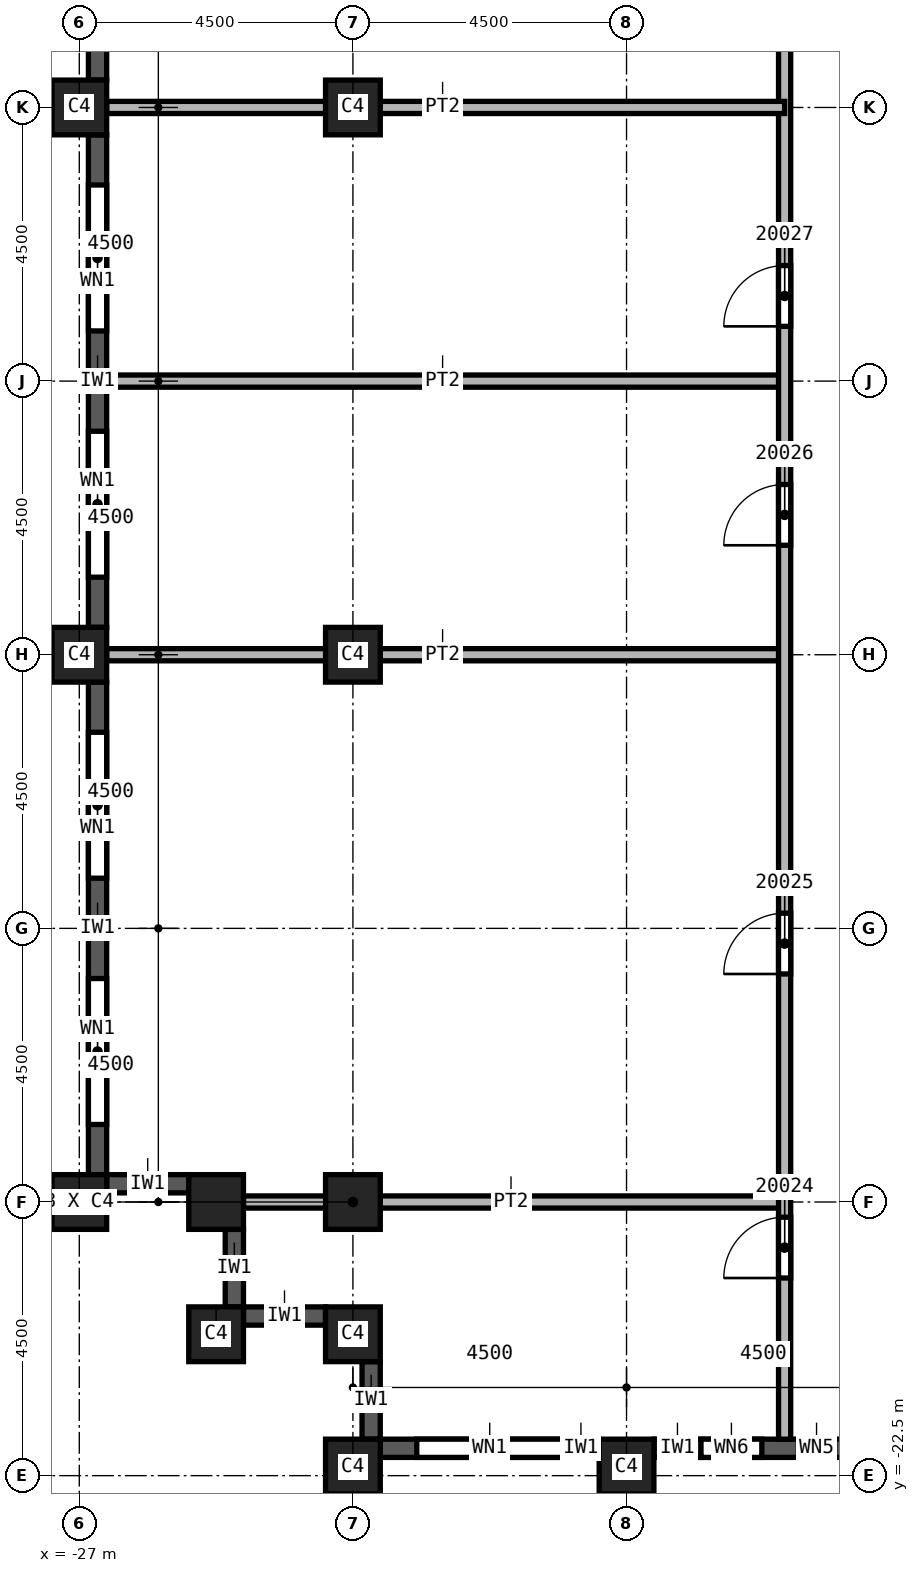
"""IFC4 building model, lengths in metres.
Left out: names, types, materials, properties, quantities, classifications, styles, units other than length and angle.
Written with IfcOpenShell. Run it as: python <this file> out.ifc"""

import sys

from ifc_helpers import new_model, si_unit, direction, frame, frame_2d, origin, origin_2d, place, context, subcontext, project, spatial, rectangle, extrude, element, fill, save


model = new_model("IFC4")
c1 = context("Model", 3, precision=1e-05, world=origin(), true_north=direction((0.0, 1.0)))
c2 = subcontext(c1, "Body", "Model", "MODEL_VIEW")
j1 = project(units=[si_unit("LENGTHUNIT", "METRE"), si_unit("PLANEANGLEUNIT", "RADIAN")], contexts=[c1])
p1 = place(None, origin())
s1 = spatial("IfcSite", under=j1, at=p1, CompositionType="ELEMENT")
p2 = place(p1, origin())
s2 = spatial("IfcBuilding", under=s1, at=p2, CompositionType="ELEMENT")
p3 = place(p2, frame((0.0, 0.0, 290.0)))
s3 = spatial("IfcBuildingStorey", under=s2, at=p3, CompositionType="ELEMENT", Elevation=290.0)
for number, where, z_axis, x_axis in (
    (1, (-22.5, 0.0, 0.0), (0.0, 0.0, 1.0), (1.0, 0.0, 0.0)),
    (2, (-22.5, -9.0, 0.0), (0.0, 0.0, 1.0), (1.0, 0.0, 0.0)),
    (3, (-22.5, -18.0, 0.0), (0.0, 0.0, 1.0), (1.0, 0.0, 0.0)),
    (4, (-18.0, -22.35, 0.0), (0.0, 0.0, 1.0), (1.0, 0.0, 0.0)),
    (5, (-22.5, -22.35, 0.0), (0.0, 0.0, 1.0), (1.0, 0.0, 0.0)),
    (6, (-27.0, 0.0, 0.0), (0.0, 0.0, 1.0), (0.0, 1.0, 0.0)),
    (7, (-27.0, -9.0, 0.0), (0.0, 0.0, 1.0), (0.0, 1.0, 0.0)),
    (8, (-27.0, -18.0, 0.0), (0.0, 0.0, 1.0), (0.0, 1.0, 0.0)),
    (9, (-22.5, -20.175, 0.0), (0.0, 0.0, 1.0), (1.0, 0.0, 0.0)),
    (10, (-24.75, -20.175, 0.0), (0.0, 0.0, 1.0), (1.0, 0.0, 0.0)),
    (11, (-24.75, -18.0, 0.0), (0.0, 0.0, 1.0), (1.0, 0.0, 0.0)),
):
    element("IfcColumn", number, at=place(p3, frame(where, z_axis=z_axis, x_axis=x_axis)), inside=s3, PredefinedType="COLUMN", context=c2, shape_type="SweptSolid", body=[
        extrude(rectangle(XDim=0.9, YDim=0.9, at=origin_2d()), origin(), (0.0, 0.0, 1.0), 3.59),
    ])
p4 = place(p3, frame((-26.7, 8.55, 0.0), z_axis=(0.0, 0.0, 1.0), x_axis=(0.0, -1.0, 0.0)))
e12 = element("IfcWall", 12, at=p4, inside=s3, PredefinedType="SOLIDWALL", context=c2, shape_type="SweptSolid", body=[
    extrude(rectangle(XDim=8.1, YDim=0.3, at=frame_2d((4.05, 0.0))), origin(), (0.0, 0.0, 1.0), 2.99),
])
p5 = place(p4, frame((0.825, 0.0, 0.8)))
e13 = element("IfcOpeningElement", 13, at=p5, cuts=e12, PredefinedType="OPENING", context=c2, shape_type="SweptSolid", body=[
    extrude(rectangle(XDim=2.4, YDim=1.95, at=frame_2d((1.2, 0.975))), frame((0.0, 0.15, 0.0), z_axis=(0.0, -1.0, 0.0), x_axis=(1.0, 0.0, 0.0)), (0.0, 0.0, 1.0), 0.3),
])
p6 = place(p4, frame((4.875, 0.0, 0.8)))
e14 = element("IfcOpeningElement", 14, at=p6, cuts=e12, PredefinedType="OPENING", context=c2, shape_type="SweptSolid", body=[
    extrude(rectangle(XDim=2.4, YDim=1.95, at=frame_2d((1.2, 0.975))), frame((0.0, 0.15, 0.0), z_axis=(0.0, -1.0, 0.0), x_axis=(1.0, 0.0, 0.0)), (0.0, 0.0, 1.0), 0.3),
])
p7 = place(p3, frame((-26.7, -0.45, 0.0), z_axis=(0.0, 0.0, 1.0), x_axis=(0.0, -1.0, 0.0)))
e15 = element("IfcWall", 15, at=p7, inside=s3, PredefinedType="SOLIDWALL", context=c2, shape_type="SweptSolid", body=[
    extrude(rectangle(XDim=8.1, YDim=0.3, at=frame_2d((4.05, 0.0))), origin(), (0.0, 0.0, 1.0), 2.99),
])
p8 = place(p7, frame((0.825, 0.0, 0.8)))
e16 = element("IfcOpeningElement", 16, at=p8, cuts=e15, PredefinedType="OPENING", context=c2, shape_type="SweptSolid", body=[
    extrude(rectangle(XDim=2.4, YDim=1.95, at=frame_2d((1.2, 0.975))), frame((0.0, 0.15, 0.0), z_axis=(0.0, -1.0, 0.0), x_axis=(1.0, 0.0, 0.0)), (0.0, 0.0, 1.0), 0.3),
])
p9 = place(p7, frame((4.875, 0.0, 0.8)))
e17 = element("IfcOpeningElement", 17, at=p9, cuts=e15, PredefinedType="OPENING", context=c2, shape_type="SweptSolid", body=[
    extrude(rectangle(XDim=2.4, YDim=1.95, at=frame_2d((1.2, 0.975))), frame((0.0, 0.15, 0.0), z_axis=(0.0, -1.0, 0.0), x_axis=(1.0, 0.0, 0.0)), (0.0, 0.0, 1.0), 0.3),
])
p10 = place(p3, frame((-26.7, -9.45, 0.0), z_axis=(0.0, 0.0, 1.0), x_axis=(0.0, -1.0, 0.0)))
e18 = element("IfcWall", 18, at=p10, inside=s3, PredefinedType="SOLIDWALL", context=c2, shape_type="SweptSolid", body=[
    extrude(rectangle(XDim=8.1, YDim=0.3, at=frame_2d((4.05, 0.0))), origin(), (0.0, 0.0, 1.0), 2.99),
])
p11 = place(p10, frame((0.825, 0.0, 0.8)))
e19 = element("IfcOpeningElement", 19, at=p11, cuts=e18, PredefinedType="OPENING", context=c2, shape_type="SweptSolid", body=[
    extrude(rectangle(XDim=2.4, YDim=1.95, at=frame_2d((1.2, 0.975))), frame((0.0, 0.15, 0.0), z_axis=(0.0, -1.0, 0.0), x_axis=(1.0, 0.0, 0.0)), (0.0, 0.0, 1.0), 0.3),
])
p12 = place(p10, frame((4.875, 0.0, 0.8)))
e20 = element("IfcOpeningElement", 20, at=p12, cuts=e18, PredefinedType="OPENING", context=c2, shape_type="SweptSolid", body=[
    extrude(rectangle(XDim=2.4, YDim=1.95, at=frame_2d((1.2, 0.975))), frame((0.0, 0.15, 0.0), z_axis=(0.0, -1.0, 0.0), x_axis=(1.0, 0.0, 0.0)), (0.0, 0.0, 1.0), 0.3),
])
p13 = place(p3, frame((-26.55, -17.7, 0.0), z_axis=(0.0, 0.0, 1.0), x_axis=(1.0, 0.0, 0.0)))
e21 = element("IfcWall", 21, at=p13, inside=s3, PredefinedType="SOLIDWALL", context=c2, shape_type="SweptSolid", body=[
    extrude(rectangle(XDim=1.35, YDim=0.3, at=frame_2d((0.675, 0.0))), origin(), (0.0, 0.0, 1.0), 2.99),
])
p14 = place(p3, frame((-24.45, -18.45, 0.0), z_axis=(0.0, 0.0, 1.0), x_axis=(0.0, -1.0, 0.0)))
e22 = element("IfcWall", 22, at=p14, inside=s3, PredefinedType="SOLIDWALL", context=c2, shape_type="SweptSolid", body=[
    extrude(rectangle(XDim=1.275, YDim=0.3, at=frame_2d((0.638, 0.0))), origin(), (0.0, 0.0, 1.0), 2.99),
])
p15 = place(p3, frame((-24.3, -19.875, 0.0), z_axis=(0.0, 0.0, 1.0), x_axis=(1.0, 0.0, 0.0)))
e23 = element("IfcWall", 23, at=p15, inside=s3, PredefinedType="SOLIDWALL", context=c2, shape_type="SweptSolid", body=[
    extrude(rectangle(XDim=1.35, YDim=0.3, at=frame_2d((0.675, 0.0))), origin(), (0.0, 0.0, 1.0), 2.99),
])
p16 = place(p3, frame((-22.2, -20.625, 0.0), z_axis=(0.0, 0.0, 1.0), x_axis=(0.0, -1.0, 0.0)))
e24 = element("IfcWall", 24, at=p16, inside=s3, PredefinedType="SOLIDWALL", context=c2, shape_type="SweptSolid", body=[
    extrude(rectangle(XDim=1.275, YDim=0.3, at=frame_2d((0.637, 0.0))), origin(), (0.0, 0.0, 1.0), 2.99),
])
p17 = place(p3, frame((-22.05, -22.05, 0.0), z_axis=(0.0, 0.0, 1.0), x_axis=(1.0, 0.0, 0.0)))
e25 = element("IfcWall", 25, at=p17, inside=s3, PredefinedType="SOLIDWALL", context=c2, shape_type="SweptSolid", body=[
    extrude(rectangle(XDim=3.6, YDim=0.3, at=frame_2d((1.8, 0.0))), origin(), (0.0, 0.0, 1.0), 2.99),
])
p18 = place(p17, frame((0.6, 0.0, 0.8)))
e26 = element("IfcOpeningElement", 26, at=p18, cuts=e25, PredefinedType="OPENING", context=c2, shape_type="SweptSolid", body=[
    extrude(rectangle(XDim=2.4, YDim=1.95, at=frame_2d((1.2, 0.975))), frame((0.0, 0.15, 0.0), z_axis=(0.0, -1.0, 0.0), x_axis=(1.0, 0.0, 0.0)), (0.0, 0.0, 1.0), 0.3),
])
p19 = place(p3, frame((-17.55, -22.05, 0.0), z_axis=(0.0, 0.0, 1.0), x_axis=(1.0, 0.0, 0.0)))
e27 = element("IfcWall", 27, at=p19, inside=s3, PredefinedType="SOLIDWALL", context=c2, shape_type="SweptSolid", body=[
    extrude(rectangle(XDim=3.6, YDim=0.3, at=frame_2d((1.8, 0.0))), origin(), (0.0, 0.0, 1.0), 2.99),
])
p20 = place(p19, frame((0.775, 0.0, 0.8)))
e28 = element("IfcOpeningElement", 28, at=p20, cuts=e27, PredefinedType="OPENING", context=c2, shape_type="SweptSolid", body=[
    extrude(rectangle(XDim=1.0, YDim=1.95, at=frame_2d((0.5, 0.975))), frame((0.0, 0.15, 0.0), z_axis=(0.0, -1.0, 0.0), x_axis=(1.0, 0.0, 0.0)), (0.0, 0.0, 1.0), 0.3),
])
p21 = place(p19, frame((2.375, 0.0, 0.8)))
e29 = element("IfcOpeningElement", 29, at=p21, cuts=e27, PredefinedType="OPENING", context=c2, shape_type="SweptSolid", body=[
    extrude(rectangle(XDim=0.6, YDim=1.95, at=frame_2d((0.3, 0.975))), frame((0.0, 0.15, 0.0), z_axis=(0.0, -1.0, 0.0), x_axis=(1.0, 0.0, 0.0)), (0.0, 0.0, 1.0), 0.3),
])
for number, where, z_axis, x_axis in (
    (30, (-26.55, -9.0, 0.0), (0.0, 0.0, 1.0), (1.0, 0.0, 0.0)),
    (31, (-26.55, -4.5, 0.0), (0.0, 0.0, 1.0), (1.0, 0.0, 0.0)),
):
    element("IfcWall", number, at=place(p3, frame(where, z_axis=z_axis, x_axis=x_axis)), inside=s3, PredefinedType="PARTITIONING", context=c2, shape_type="SweptSolid", body=[
        extrude(rectangle(XDim=11.15, YDim=0.2, at=frame_2d((5.575, 0.0))), origin(), (0.0, 0.0, 1.0), 3.59),
    ])
p22 = place(p3, frame((-24.3, -18.0, 0.0), z_axis=(0.0, 0.0, 1.0), x_axis=(1.0, 0.0, 0.0)))
e32 = element("IfcWall", 32, at=p22, inside=s3, PredefinedType="PARTITIONING", context=c2, shape_type="SweptSolid", body=[
    extrude(rectangle(XDim=8.9, YDim=0.2, at=frame_2d((4.45, 0.0))), origin(), (0.0, 0.0, 1.0), 3.59),
])
p23 = place(p3, frame((-15.4, -21.9, 0.0), z_axis=(0.0, 0.0, 1.0), x_axis=(0.0, 1.0, 0.0)))
e33 = element("IfcWall", 33, at=p23, inside=s3, PredefinedType="PARTITIONING", context=c2, shape_type="SweptSolid", body=[
    extrude(rectangle(XDim=35.5, YDim=0.2, at=frame_2d((17.75, 0.0))), origin(), (0.0, 0.0, 1.0), 3.59),
])
p24 = place(p23, frame((30.9, 0.0, 0.0)))
e34 = element("IfcOpeningElement", 34, at=p24, cuts=e33, PredefinedType="OPENING", context=c2, shape_type="SweptSolid", body=[
    extrude(rectangle(XDim=1.0, YDim=2.1, at=frame_2d((0.5, 1.05))), frame((0.0, 0.1, 0.0), z_axis=(0.0, -1.0, 0.0), x_axis=(1.0, 0.0, 0.0)), (0.0, 0.0, 1.0), 0.2),
])
p25 = place(p23, frame((2.65, 0.0, 0.0)))
e35 = element("IfcOpeningElement", 35, at=p25, cuts=e33, PredefinedType="OPENING", context=c2, shape_type="SweptSolid", body=[
    extrude(rectangle(XDim=1.0, YDim=2.1, at=frame_2d((0.5, 1.05))), frame((0.0, 0.1, 0.0), z_axis=(0.0, -1.0, 0.0), x_axis=(1.0, 0.0, 0.0)), (0.0, 0.0, 1.0), 0.2),
])
p26 = place(p23, frame((7.65, 0.0, 0.0)))
e36 = element("IfcOpeningElement", 36, at=p26, cuts=e33, PredefinedType="OPENING", context=c2, shape_type="SweptSolid", body=[
    extrude(rectangle(XDim=1.0, YDim=2.1, at=frame_2d((0.5, 1.05))), frame((0.0, 0.1, 0.0), z_axis=(0.0, -1.0, 0.0), x_axis=(1.0, 0.0, 0.0)), (0.0, 0.0, 1.0), 0.2),
])
p27 = place(p23, frame((14.7, 0.0, 0.0)))
e37 = element("IfcOpeningElement", 37, at=p27, cuts=e33, PredefinedType="OPENING", context=c2, shape_type="SweptSolid", body=[
    extrude(rectangle(XDim=1.0, YDim=2.1, at=frame_2d((0.5, 1.05))), frame((0.0, 0.1, 0.0), z_axis=(0.0, -1.0, 0.0), x_axis=(1.0, 0.0, 0.0)), (0.0, 0.0, 1.0), 0.2),
])
p28 = place(p23, frame((18.3, 0.0, 0.0)))
e38 = element("IfcOpeningElement", 38, at=p28, cuts=e33, PredefinedType="OPENING", context=c2, shape_type="SweptSolid", body=[
    extrude(rectangle(XDim=1.0, YDim=2.1, at=frame_2d((0.5, 1.05))), frame((0.0, 0.1, 0.0), z_axis=(0.0, -1.0, 0.0), x_axis=(1.0, 0.0, 0.0)), (0.0, 0.0, 1.0), 0.2),
])
p29 = place(p3, frame((-15.4, 0.0, 0.0), z_axis=(0.0, 0.0, 1.0), x_axis=(-1.0, 0.0, 0.0)))
e39 = element("IfcWall", 39, at=p29, inside=s3, PredefinedType="PARTITIONING", context=c2, shape_type="SweptSolid", body=[
    extrude(rectangle(XDim=11.15, YDim=0.2, at=frame_2d((5.575, 0.0))), origin(), (0.0, 0.0, 1.0), 3.59),
])
p30 = place(p8, origin())
e40 = element("IfcWindow", 40, at=p30, inside=s3, PartitioningType="SINGLE_PANEL", PredefinedType="WINDOW", context=c2, shape_type="SweptSolid", body=[
    extrude(rectangle(XDim=2.4, YDim=1.95, at=frame_2d((1.2, 0.975))), frame((0.0, 0.03, 0.0), z_axis=(0.0, -1.0, 0.0), x_axis=(1.0, 0.0, 0.0)), (0.0, 0.0, 1.0), 0.06),
])
fill(e16, e40)
p31 = place(p9, origin())
e41 = element("IfcWindow", 41, at=p31, inside=s3, PartitioningType="SINGLE_PANEL", PredefinedType="WINDOW", context=c2, shape_type="SweptSolid", body=[
    extrude(rectangle(XDim=2.4, YDim=1.95, at=frame_2d((1.2, 0.975))), frame((0.0, 0.03, 0.0), z_axis=(0.0, -1.0, 0.0), x_axis=(1.0, 0.0, 0.0)), (0.0, 0.0, 1.0), 0.06),
])
fill(e17, e41)
p32 = place(p11, origin())
e42 = element("IfcWindow", 42, at=p32, inside=s3, PartitioningType="SINGLE_PANEL", PredefinedType="WINDOW", context=c2, shape_type="SweptSolid", body=[
    extrude(rectangle(XDim=2.4, YDim=1.95, at=frame_2d((1.2, 0.975))), frame((0.0, 0.03, 0.0), z_axis=(0.0, -1.0, 0.0), x_axis=(1.0, 0.0, 0.0)), (0.0, 0.0, 1.0), 0.06),
])
fill(e19, e42)
p33 = place(p12, origin())
e43 = element("IfcWindow", 43, at=p33, inside=s3, PartitioningType="SINGLE_PANEL", PredefinedType="WINDOW", context=c2, shape_type="SweptSolid", body=[
    extrude(rectangle(XDim=2.4, YDim=1.95, at=frame_2d((1.2, 0.975))), frame((0.0, 0.03, 0.0), z_axis=(0.0, -1.0, 0.0), x_axis=(1.0, 0.0, 0.0)), (0.0, 0.0, 1.0), 0.06),
])
fill(e20, e43)
p34 = place(p18, origin())
e44 = element("IfcWindow", 44, at=p34, inside=s3, PartitioningType="SINGLE_PANEL", PredefinedType="WINDOW", context=c2, shape_type="SweptSolid", body=[
    extrude(rectangle(XDim=2.4, YDim=1.95, at=frame_2d((1.2, 0.975))), frame((0.0, 0.03, 0.0), z_axis=(0.0, -1.0, 0.0), x_axis=(1.0, 0.0, 0.0)), (0.0, 0.0, 1.0), 0.06),
])
fill(e26, e44)
p35 = place(p25, origin())
e45 = element("IfcDoor", 45, at=p35, inside=s3, OperationType="SINGLE_SWING_LEFT", PredefinedType="DOOR", context=c2, shape_type="SweptSolid", body=[
    extrude(rectangle(XDim=1.0, YDim=2.1, at=frame_2d((0.5, 1.05))), frame((0.0, 0.025, 0.0), z_axis=(0.0, -1.0, 0.0), x_axis=(1.0, 0.0, 0.0)), (0.0, 0.0, 1.0), 0.05),
])
fill(e35, e45)
p36 = place(p26, origin())
e46 = element("IfcDoor", 46, at=p36, inside=s3, OperationType="SINGLE_SWING_RIGHT", PredefinedType="DOOR", context=c2, shape_type="SweptSolid", body=[
    extrude(rectangle(XDim=1.0, YDim=2.1, at=frame_2d((0.5, 1.05))), frame((0.0, 0.025, 0.0), z_axis=(0.0, -1.0, 0.0), x_axis=(1.0, 0.0, 0.0)), (0.0, 0.0, 1.0), 0.05),
])
fill(e36, e46)
p37 = place(p27, origin())
e47 = element("IfcDoor", 47, at=p37, inside=s3, OperationType="SINGLE_SWING_LEFT", PredefinedType="DOOR", context=c2, shape_type="SweptSolid", body=[
    extrude(rectangle(XDim=1.0, YDim=2.1, at=frame_2d((0.5, 1.05))), frame((0.0, 0.025, 0.0), z_axis=(0.0, -1.0, 0.0), x_axis=(1.0, 0.0, 0.0)), (0.0, 0.0, 1.0), 0.05),
])
fill(e37, e47)
p38 = place(p28, origin())
e48 = element("IfcDoor", 48, at=p38, inside=s3, OperationType="SINGLE_SWING_RIGHT", PredefinedType="DOOR", context=c2, shape_type="SweptSolid", body=[
    extrude(rectangle(XDim=1.0, YDim=2.1, at=frame_2d((0.5, 1.05))), frame((0.0, 0.025, 0.0), z_axis=(0.0, -1.0, 0.0), x_axis=(1.0, 0.0, 0.0)), (0.0, 0.0, 1.0), 0.05),
])
fill(e38, e48)
p39 = place(p20, origin())
e49 = element("IfcWindow", 49, at=p39, inside=s3, PartitioningType="SINGLE_PANEL", PredefinedType="WINDOW", context=c2, shape_type="SweptSolid", body=[
    extrude(rectangle(XDim=1.0, YDim=1.95, at=frame_2d((0.5, 0.975))), frame((0.0, 0.03, 0.0), z_axis=(0.0, -1.0, 0.0), x_axis=(1.0, 0.0, 0.0)), (0.0, 0.0, 1.0), 0.06),
])
fill(e28, e49)
p40 = place(p21, origin())
e50 = element("IfcWindow", 50, at=p40, inside=s3, PartitioningType="SINGLE_PANEL", PredefinedType="WINDOW", context=c2, shape_type="SweptSolid", body=[
    extrude(rectangle(XDim=0.6, YDim=1.95, at=frame_2d((0.3, 0.975))), frame((0.0, 0.03, 0.0), z_axis=(0.0, -1.0, 0.0), x_axis=(1.0, 0.0, 0.0)), (0.0, 0.0, 1.0), 0.06),
])
fill(e29, e50)
save(model, sys.argv[1])
